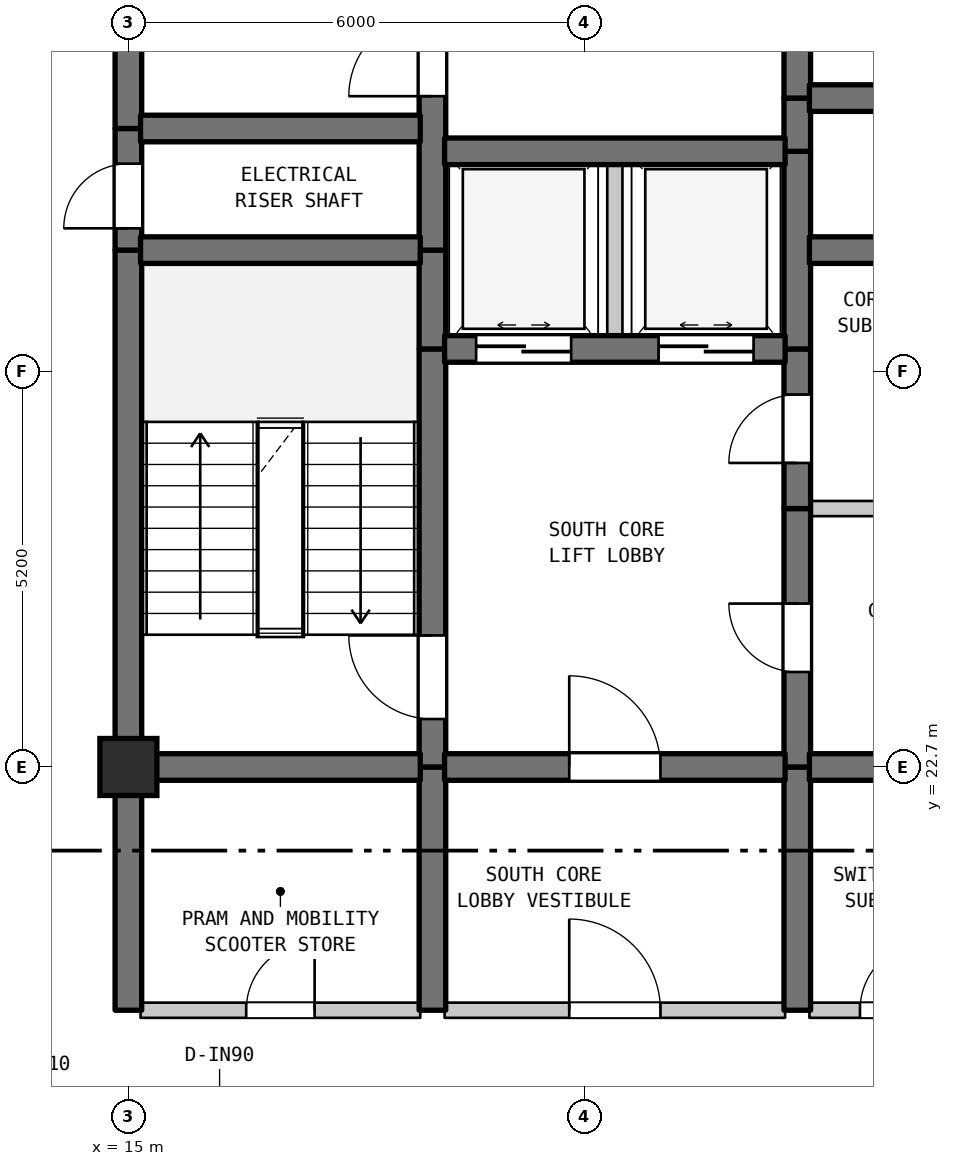
"""IFC4 building model, lengths in metres.
Left out: names, types, materials, properties, quantities, classifications, styles, units other than length and angle.
Written with IfcOpenShell. Run it as: python <this file> out.ifc"""

import sys

from ifc_helpers import new_model, si_unit, direction, frame, frame_2d, origin, origin_2d, place, context, subcontext, project, spatial, rectangle, extrude, element, fill, save


model = new_model("IFC4")
c1 = context("Model", 3, precision=1e-05, world=origin(), true_north=direction((0.0, 1.0)))
c2 = subcontext(c1, "Body", "Model", "MODEL_VIEW")
j1 = project(units=[si_unit("LENGTHUNIT", "METRE"), si_unit("PLANEANGLEUNIT", "RADIAN")], contexts=[c1])
p1 = place(None, origin())
s1 = spatial("IfcSite", under=j1, at=p1, CompositionType="ELEMENT")
p2 = place(p1, origin())
s2 = spatial("IfcBuilding", under=s1, at=p2, CompositionType="ELEMENT")
p3 = place(p2, frame((0.0, 0.0, 273.2)))
s3 = spatial("IfcBuildingStorey", under=s2, at=p3, CompositionType="ELEMENT", Elevation=273.2)
p4 = place(p3, frame((15.0, 22.7, 0.0), z_axis=(0.0, 0.0, 1.0), x_axis=(1.0, 0.0, 0.0)))
e1 = element("IfcColumn", 1, at=p4, inside=s3, PredefinedType="COLUMN", context=c2, shape_type="SweptSolid", body=[
    extrude(rectangle(XDim=0.75, YDim=0.75, at=origin_2d()), origin(), (0.0, 0.0, 1.0), 3.7),
])
p5 = place(p3, frame((15.0, 19.5, 0.0), z_axis=(0.0, 0.0, 1.0), x_axis=(0.0, 1.0, 0.0)))
e2 = element("IfcWall", 2, at=p5, inside=s3, PredefinedType="SHEAR", context=c2, shape_type="SweptSolid", body=[
    extrude(rectangle(XDim=3.2, YDim=0.35, at=frame_2d((1.6, 0.0))), origin(), (0.0, 0.0, 1.0), 3.39),
])
p6 = place(p3, frame((15.0, 22.7, 0.0), z_axis=(0.0, 0.0, 1.0), x_axis=(0.0, 1.0, 0.0)))
e3 = element("IfcWall", 3, at=p6, inside=s3, PredefinedType="SHEAR", context=c2, shape_type="SweptSolid", body=[
    extrude(rectangle(XDim=6.8, YDim=0.35, at=frame_2d((3.4, 0.0))), origin(), (0.0, 0.0, 1.0), 3.39),
])
p7 = place(p3, frame((15.0, 29.5, 0.0), z_axis=(0.0, 0.0, 1.0), x_axis=(0.0, 1.0, 0.0)))
e4 = element("IfcWall", 4, at=p7, inside=s3, PredefinedType="SHEAR", context=c2, shape_type="SweptSolid", body=[
    extrude(rectangle(XDim=1.6, YDim=0.35, at=frame_2d((0.8, 0.0))), origin(), (0.0, 0.0, 1.0), 3.39),
])
p8 = place(p7, frame((0.287, 0.0, 0.0)))
e5 = element("IfcOpeningElement", 5, at=p8, cuts=e4, PredefinedType="OPENING", context=c2, shape_type="SweptSolid", body=[
    extrude(rectangle(XDim=0.85, YDim=2.1, at=frame_2d((0.425, 1.05))), frame((0.0, 0.185, 0.0), z_axis=(0.0, -1.0, 0.0), x_axis=(1.0, 0.0, 0.0)), (0.0, 0.0, 1.0), 0.37),
])
p9 = place(p3, frame((15.0, 31.1, 0.0), z_axis=(0.0, 0.0, 1.0), x_axis=(0.0, 1.0, 0.0)))
e6 = element("IfcWall", 6, at=p9, inside=s3, PredefinedType="SHEAR", context=c2, shape_type="SweptSolid", body=[
    extrude(rectangle(XDim=6.8, YDim=0.35, at=frame_2d((3.4, 0.0))), origin(), (0.0, 0.0, 1.0), 3.39),
])
p10 = place(p3, frame((19.0, 19.5, 0.0), z_axis=(0.0, 0.0, 1.0), x_axis=(0.0, 1.0, 0.0)))
e7 = element("IfcWall", 7, at=p10, inside=s3, PredefinedType="SHEAR", context=c2, shape_type="SweptSolid", body=[
    extrude(rectangle(XDim=3.2, YDim=0.35, at=frame_2d((1.6, 0.0))), origin(), (0.0, 0.0, 1.0), 3.39),
])
p11 = place(p3, frame((19.0, 22.7, 0.0), z_axis=(0.0, 0.0, 1.0), x_axis=(0.0, 1.0, 0.0)))
e8 = element("IfcWall", 8, at=p11, inside=s3, PredefinedType="SHEAR", context=c2, shape_type="SweptSolid", body=[
    extrude(rectangle(XDim=5.5, YDim=0.35, at=frame_2d((2.75, 0.0))), origin(), (0.0, 0.0, 1.0), 3.39),
])
p12 = place(p11, frame((0.631, 0.0, 0.0)))
e9 = element("IfcOpeningElement", 9, at=p12, cuts=e8, PredefinedType="OPENING", context=c2, shape_type="SweptSolid", body=[
    extrude(rectangle(XDim=1.1, YDim=2.15, at=frame_2d((0.55, 1.075))), frame((0.0, 0.185, 0.0), z_axis=(0.0, -1.0, 0.0), x_axis=(1.0, 0.0, 0.0)), (0.0, 0.0, 1.0), 0.37),
])
p13 = place(p3, frame((19.0, 28.2, 0.0), z_axis=(0.0, 0.0, 1.0), x_axis=(0.0, 1.0, 0.0)))
e10 = element("IfcWall", 10, at=p13, inside=s3, PredefinedType="SHEAR", context=c2, shape_type="SweptSolid", body=[
    extrude(rectangle(XDim=1.3, YDim=0.35, at=frame_2d((0.65, 0.0))), origin(), (0.0, 0.0, 1.0), 3.39),
])
p14 = place(p3, frame((19.0, 29.5, 0.0), z_axis=(0.0, 0.0, 1.0), x_axis=(0.0, 1.0, 0.0)))
e11 = element("IfcWall", 11, at=p14, inside=s3, PredefinedType="SHEAR", context=c2, shape_type="SweptSolid", body=[
    extrude(rectangle(XDim=5.5, YDim=0.35, at=frame_2d((2.75, 0.0))), origin(), (0.0, 0.0, 1.0), 3.39),
])
p15 = place(p14, frame((2.025, 0.0, 0.0)))
e12 = element("IfcOpeningElement", 12, at=p15, cuts=e11, PredefinedType="OPENING", context=c2, shape_type="SweptSolid", body=[
    extrude(rectangle(XDim=1.1, YDim=2.15, at=frame_2d((0.55, 1.075))), frame((0.0, 0.185, 0.0), z_axis=(0.0, -1.0, 0.0), x_axis=(1.0, 0.0, 0.0)), (0.0, 0.0, 1.0), 0.37),
])
p16 = place(p3, frame((21.4, 28.2, 0.0), z_axis=(0.0, 0.0, 1.0), x_axis=(0.0, 1.0, 0.0)))
e13 = element("IfcWall", 13, at=p16, inside=s3, PredefinedType="STANDARD", context=c2, shape_type="SweptSolid", body=[
    extrude(rectangle(XDim=2.6, YDim=0.2, at=frame_2d((1.3, 0.0))), origin(), (0.0, 0.0, 1.0), 3.39),
])
p17 = place(p3, frame((23.8, 19.5, 0.0), z_axis=(0.0, 0.0, 1.0), x_axis=(0.0, 1.0, 0.0)))
e14 = element("IfcWall", 14, at=p17, inside=s3, PredefinedType="SHEAR", context=c2, shape_type="SweptSolid", body=[
    extrude(rectangle(XDim=3.2, YDim=0.35, at=frame_2d((1.6, 0.0))), origin(), (0.0, 0.0, 1.0), 3.39),
])
p18 = place(p3, frame((23.8, 22.7, 0.0), z_axis=(0.0, 0.0, 1.0), x_axis=(0.0, 1.0, 0.0)))
e15 = element("IfcWall", 15, at=p18, inside=s3, PredefinedType="SHEAR", context=c2, shape_type="SweptSolid", body=[
    extrude(rectangle(XDim=3.4, YDim=0.35, at=frame_2d((1.7, 0.0))), origin(), (0.0, 0.0, 1.0), 3.39),
])
p19 = place(p18, frame((1.25, 0.0, 0.0)))
e16 = element("IfcOpeningElement", 16, at=p19, cuts=e15, PredefinedType="OPENING", context=c2, shape_type="SweptSolid", body=[
    extrude(rectangle(XDim=0.9, YDim=2.15, at=frame_2d((0.45, 1.075))), frame((0.0, 0.185, 0.0), z_axis=(0.0, -1.0, 0.0), x_axis=(1.0, 0.0, 0.0)), (0.0, 0.0, 1.0), 0.37),
])
p20 = place(p3, frame((23.8, 26.1, 0.0), z_axis=(0.0, 0.0, 1.0), x_axis=(0.0, 1.0, 0.0)))
e17 = element("IfcWall", 17, at=p20, inside=s3, PredefinedType="SHEAR", context=c2, shape_type="SweptSolid", body=[
    extrude(rectangle(XDim=2.1, YDim=0.35, at=frame_2d((1.05, 0.0))), origin(), (0.0, 0.0, 1.0), 3.39),
])
p21 = place(p20, frame((0.6, 0.0, 0.0)))
e18 = element("IfcOpeningElement", 18, at=p21, cuts=e17, PredefinedType="OPENING", context=c2, shape_type="SweptSolid", body=[
    extrude(rectangle(XDim=0.9, YDim=2.15, at=frame_2d((0.45, 1.075))), frame((0.0, 0.185, 0.0), z_axis=(0.0, -1.0, 0.0), x_axis=(1.0, 0.0, 0.0)), (0.0, 0.0, 1.0), 0.37),
])
p22 = place(p3, frame((23.8, 28.2, 0.0), z_axis=(0.0, 0.0, 1.0), x_axis=(0.0, 1.0, 0.0)))
e19 = element("IfcWall", 19, at=p22, inside=s3, PredefinedType="SHEAR", context=c2, shape_type="SweptSolid", body=[
    extrude(rectangle(XDim=2.6, YDim=0.35, at=frame_2d((1.3, 0.0))), origin(), (0.0, 0.0, 1.0), 3.39),
])
p23 = place(p3, frame((23.8, 30.8, 0.0), z_axis=(0.0, 0.0, 1.0), x_axis=(0.0, 1.0, 0.0)))
e20 = element("IfcWall", 20, at=p23, inside=s3, PredefinedType="SHEAR", context=c2, shape_type="SweptSolid", body=[
    extrude(rectangle(XDim=0.7, YDim=0.35, at=frame_2d((0.35, 0.0))), origin(), (0.0, 0.0, 1.0), 3.39),
])
p24 = place(p3, frame((23.8, 31.5, 0.0), z_axis=(0.0, 0.0, 1.0), x_axis=(0.0, 1.0, 0.0)))
e21 = element("IfcWall", 21, at=p24, inside=s3, PredefinedType="SHEAR", context=c2, shape_type="SweptSolid", body=[
    extrude(rectangle(XDim=3.5, YDim=0.35, at=frame_2d((1.75, 0.0))), origin(), (0.0, 0.0, 1.0), 3.39),
])
p25 = place(p24, frame((1.127, 0.0, 0.0)))
e22 = element("IfcOpeningElement", 22, at=p25, cuts=e21, PredefinedType="OPENING", context=c2, shape_type="SweptSolid", body=[
    extrude(rectangle(XDim=1.1, YDim=2.15, at=frame_2d((0.55, 1.075))), frame((0.0, 0.185, 0.0), z_axis=(0.0, -1.0, 0.0), x_axis=(1.0, 0.0, 0.0)), (0.0, 0.0, 1.0), 0.37),
])
p26 = place(p3, frame((15.16, 19.5, 0.0), z_axis=(0.0, 0.0, 1.0), x_axis=(1.0, 0.0, 0.0)))
e23 = element("IfcWall", 23, at=p26, inside=s3, PredefinedType="STANDARD", context=c2, shape_type="SweptSolid", body=[
    extrude(rectangle(XDim=3.68, YDim=0.2, at=frame_2d((1.84, 0.0))), origin(), (0.0, 0.0, 1.0), 3.39),
])
p27 = place(p26, frame((1.39, 0.0, 0.0)))
e24 = element("IfcOpeningElement", 24, at=p27, cuts=e23, PredefinedType="OPENING", context=c2, shape_type="SweptSolid", body=[
    extrude(rectangle(XDim=0.9, YDim=2.15, at=frame_2d((0.45, 1.075))), frame((0.0, 0.11, 0.0), z_axis=(0.0, -1.0, 0.0), x_axis=(1.0, 0.0, 0.0)), (0.0, 0.0, 1.0), 0.22),
])
p28 = place(p3, frame((19.16, 19.5, 0.0), z_axis=(0.0, 0.0, 1.0), x_axis=(1.0, 0.0, 0.0)))
e25 = element("IfcWall", 25, at=p28, inside=s3, PredefinedType="STANDARD", context=c2, shape_type="SweptSolid", body=[
    extrude(rectangle(XDim=4.48, YDim=0.2, at=frame_2d((2.24, 0.0))), origin(), (0.0, 0.0, 1.0), 3.39),
])
p29 = place(p28, frame((1.64, 0.0, 0.0)))
e26 = element("IfcOpeningElement", 26, at=p29, cuts=e25, PredefinedType="OPENING", context=c2, shape_type="SweptSolid", body=[
    extrude(rectangle(XDim=1.2, YDim=2.2, at=frame_2d((0.6, 1.1))), frame((0.0, 0.11, 0.0), z_axis=(0.0, -1.0, 0.0), x_axis=(1.0, 0.0, 0.0)), (0.0, 0.0, 1.0), 0.22),
])
p30 = place(p3, frame((23.96, 19.5, 0.0), z_axis=(0.0, 0.0, 1.0), x_axis=(1.0, 0.0, 0.0)))
e27 = element("IfcWall", 27, at=p30, inside=s3, PredefinedType="STANDARD", context=c2, shape_type="SweptSolid", body=[
    extrude(rectangle(XDim=4.455, YDim=0.2, at=frame_2d((2.228, 0.0))), origin(), (0.0, 0.0, 1.0), 3.39),
])
p31 = place(p30, frame((0.665, 0.0, 0.0)))
e28 = element("IfcOpeningElement", 28, at=p31, cuts=e27, PredefinedType="OPENING", context=c2, shape_type="SweptSolid", body=[
    extrude(rectangle(XDim=0.9, YDim=2.15, at=frame_2d((0.45, 1.075))), frame((0.0, 0.11, 0.0), z_axis=(0.0, -1.0, 0.0), x_axis=(1.0, 0.0, 0.0)), (0.0, 0.0, 1.0), 0.22),
])
p32 = place(p30, frame((2.791, 0.0, 0.0)))
e29 = element("IfcOpeningElement", 29, at=p32, cuts=e27, PredefinedType="OPENING", context=c2, shape_type="SweptSolid", body=[
    extrude(rectangle(XDim=0.9, YDim=2.15, at=frame_2d((0.45, 1.075))), frame((0.0, 0.11, 0.0), z_axis=(0.0, -1.0, 0.0), x_axis=(1.0, 0.0, 0.0)), (0.0, 0.0, 1.0), 0.22),
])
p33 = place(p3, frame((15.16, 22.7, 0.0), z_axis=(0.0, 0.0, 1.0), x_axis=(1.0, 0.0, 0.0)))
e30 = element("IfcWall", 30, at=p33, inside=s3, PredefinedType="SHEAR", context=c2, shape_type="SweptSolid", body=[
    extrude(rectangle(XDim=3.68, YDim=0.35, at=frame_2d((1.84, 0.0))), origin(), (0.0, 0.0, 1.0), 3.39),
])
p34 = place(p3, frame((19.16, 22.7, 0.0), z_axis=(0.0, 0.0, 1.0), x_axis=(1.0, 0.0, 0.0)))
e31 = element("IfcWall", 31, at=p34, inside=s3, PredefinedType="SHEAR", context=c2, shape_type="SweptSolid", body=[
    extrude(rectangle(XDim=4.48, YDim=0.35, at=frame_2d((2.24, 0.0))), origin(), (0.0, 0.0, 1.0), 3.39),
])
p35 = place(p34, frame((1.64, 0.0, 0.0)))
e32 = element("IfcOpeningElement", 32, at=p35, cuts=e31, PredefinedType="OPENING", context=c2, shape_type="SweptSolid", body=[
    extrude(rectangle(XDim=1.2, YDim=2.2, at=frame_2d((0.6, 1.1))), frame((0.0, 0.185, 0.0), z_axis=(0.0, -1.0, 0.0), x_axis=(1.0, 0.0, 0.0)), (0.0, 0.0, 1.0), 0.37),
])
p36 = place(p3, frame((23.96, 22.7, 0.0), z_axis=(0.0, 0.0, 1.0), x_axis=(1.0, 0.0, 0.0)))
e33 = element("IfcWall", 33, at=p36, inside=s3, PredefinedType="SHEAR", context=c2, shape_type="SweptSolid", body=[
    extrude(rectangle(XDim=3.18, YDim=0.35, at=frame_2d((1.59, 0.0))), origin(), (0.0, 0.0, 1.0), 3.39),
])
p37 = place(p3, frame((23.96, 26.1, 0.0), z_axis=(0.0, 0.0, 1.0), x_axis=(1.0, 0.0, 0.0)))
e34 = element("IfcWall", 34, at=p37, inside=s3, PredefinedType="STANDARD", context=c2, shape_type="SweptSolid", body=[
    extrude(rectangle(XDim=3.18, YDim=0.2, at=frame_2d((1.59, 0.0))), origin(), (0.0, 0.0, 1.0), 3.39),
])
p38 = place(p3, frame((19.16, 28.2, 0.0), z_axis=(0.0, 0.0, 1.0), x_axis=(1.0, 0.0, 0.0)))
e35 = element("IfcWall", 35, at=p38, inside=s3, PredefinedType="SHEAR", context=c2, shape_type="SweptSolid", body=[
    extrude(rectangle(XDim=4.48, YDim=0.35, at=frame_2d((2.24, 0.0))), origin(), (0.0, 0.0, 1.0), 3.39),
])
p39 = place(p38, frame((0.415, 0.0, 0.0)))
e36 = element("IfcOpeningElement", 36, at=p39, cuts=e35, PredefinedType="OPENING", context=c2, shape_type="SweptSolid", body=[
    extrude(rectangle(XDim=1.25, YDim=2.2, at=frame_2d((0.625, 1.1))), frame((0.0, 0.185, 0.0), z_axis=(0.0, -1.0, 0.0), x_axis=(1.0, 0.0, 0.0)), (0.0, 0.0, 1.0), 0.37),
])
p40 = place(p38, frame((2.815, 0.0, 0.0)))
e37 = element("IfcOpeningElement", 37, at=p40, cuts=e35, PredefinedType="OPENING", context=c2, shape_type="SweptSolid", body=[
    extrude(rectangle(XDim=1.25, YDim=2.2, at=frame_2d((0.625, 1.1))), frame((0.0, 0.185, 0.0), z_axis=(0.0, -1.0, 0.0), x_axis=(1.0, 0.0, 0.0)), (0.0, 0.0, 1.0), 0.37),
])
p41 = place(p3, frame((15.16, 29.5, 0.0), z_axis=(0.0, 0.0, 1.0), x_axis=(1.0, 0.0, 0.0)))
e38 = element("IfcWall", 38, at=p41, inside=s3, PredefinedType="SHEAR", context=c2, shape_type="SweptSolid", body=[
    extrude(rectangle(XDim=3.68, YDim=0.35, at=frame_2d((1.84, 0.0))), origin(), (0.0, 0.0, 1.0), 3.39),
])
p42 = place(p3, frame((23.96, 29.5, 0.0), z_axis=(0.0, 0.0, 1.0), x_axis=(1.0, 0.0, 0.0)))
e39 = element("IfcWall", 39, at=p42, inside=s3, PredefinedType="SHEAR", context=c2, shape_type="SweptSolid", body=[
    extrude(rectangle(XDim=3.18, YDim=0.35, at=frame_2d((1.59, 0.0))), origin(), (0.0, 0.0, 1.0), 3.39),
])
p43 = place(p3, frame((19.16, 30.8, 0.0), z_axis=(0.0, 0.0, 1.0), x_axis=(1.0, 0.0, 0.0)))
e40 = element("IfcWall", 40, at=p43, inside=s3, PredefinedType="SHEAR", context=c2, shape_type="SweptSolid", body=[
    extrude(rectangle(XDim=4.48, YDim=0.35, at=frame_2d((2.24, 0.0))), origin(), (0.0, 0.0, 1.0), 3.39),
])
p44 = place(p3, frame((15.16, 31.1, 0.0), z_axis=(0.0, 0.0, 1.0), x_axis=(1.0, 0.0, 0.0)))
e41 = element("IfcWall", 41, at=p44, inside=s3, PredefinedType="SHEAR", context=c2, shape_type="SweptSolid", body=[
    extrude(rectangle(XDim=3.68, YDim=0.35, at=frame_2d((1.84, 0.0))), origin(), (0.0, 0.0, 1.0), 3.39),
])
p45 = place(p3, frame((23.96, 31.5, 0.0), z_axis=(0.0, 0.0, 1.0), x_axis=(1.0, 0.0, 0.0)))
e42 = element("IfcWall", 42, at=p45, inside=s3, PredefinedType="SHEAR", context=c2, shape_type="SweptSolid", body=[
    extrude(rectangle(XDim=3.18, YDim=0.35, at=frame_2d((1.59, 0.0))), origin(), (0.0, 0.0, 1.0), 3.39),
])
p46 = place(p45, frame((1.094, 0.0, 0.0)))
e43 = element("IfcOpeningElement", 43, at=p46, cuts=e42, PredefinedType="OPENING", context=c2, shape_type="SweptSolid", body=[
    extrude(rectangle(XDim=0.85, YDim=2.1, at=frame_2d((0.425, 1.05))), frame((0.0, 0.185, 0.0), z_axis=(0.0, -1.0, 0.0), x_axis=(1.0, 0.0, 0.0)), (0.0, 0.0, 1.0), 0.37),
])
p47 = place(p8, origin())
e44 = element("IfcDoor", 44, at=p47, inside=s3, OperationType="SINGLE_SWING_LEFT", PredefinedType="DOOR", context=c2, shape_type="SweptSolid", body=[
    extrude(rectangle(XDim=0.85, YDim=2.1, at=frame_2d((0.425, 1.05))), frame((0.0, 0.025, 0.0), z_axis=(0.0, -1.0, 0.0), x_axis=(1.0, 0.0, 0.0)), (0.0, 0.0, 1.0), 0.05),
])
fill(e5, e44)
p48 = place(p12, origin())
e45 = element("IfcDoor", 45, at=p48, inside=s3, OperationType="SINGLE_SWING_RIGHT", PredefinedType="DOOR", context=c2, shape_type="SweptSolid", body=[
    extrude(rectangle(XDim=1.1, YDim=2.15, at=frame_2d((0.55, 1.075))), frame((0.0, 0.025, 0.0), z_axis=(0.0, -1.0, 0.0), x_axis=(1.0, 0.0, 0.0)), (0.0, 0.0, 1.0), 0.05),
])
fill(e9, e45)
p49 = place(p15, origin())
e46 = element("IfcDoor", 46, at=p49, inside=s3, OperationType="SINGLE_SWING_LEFT", PredefinedType="DOOR", context=c2, shape_type="SweptSolid", body=[
    extrude(rectangle(XDim=1.1, YDim=2.15, at=frame_2d((0.55, 1.075))), frame((0.0, 0.025, 0.0), z_axis=(0.0, -1.0, 0.0), x_axis=(1.0, 0.0, 0.0)), (0.0, 0.0, 1.0), 0.05),
])
fill(e12, e46)
p50 = place(p19, origin())
e47 = element("IfcDoor", 47, at=p50, inside=s3, OperationType="SINGLE_SWING_RIGHT", PredefinedType="DOOR", context=c2, shape_type="SweptSolid", body=[
    extrude(rectangle(XDim=0.9, YDim=2.15, at=frame_2d((0.45, 1.075))), frame((0.0, 0.025, 0.0), z_axis=(0.0, -1.0, 0.0), x_axis=(1.0, 0.0, 0.0)), (0.0, 0.0, 1.0), 0.05),
])
fill(e16, e47)
p51 = place(p21, origin())
e48 = element("IfcDoor", 48, at=p51, inside=s3, OperationType="SINGLE_SWING_LEFT", PredefinedType="DOOR", context=c2, shape_type="SweptSolid", body=[
    extrude(rectangle(XDim=0.9, YDim=2.15, at=frame_2d((0.45, 1.075))), frame((0.0, 0.025, 0.0), z_axis=(0.0, -1.0, 0.0), x_axis=(1.0, 0.0, 0.0)), (0.0, 0.0, 1.0), 0.05),
])
fill(e18, e48)
p52 = place(p27, origin())
e49 = element("IfcDoor", 49, at=p52, inside=s3, OperationType="SINGLE_SWING_RIGHT", PredefinedType="DOOR", context=c2, shape_type="SweptSolid", body=[
    extrude(rectangle(XDim=0.9, YDim=2.15, at=frame_2d((0.45, 1.075))), frame((0.0, 0.025, 0.0), z_axis=(0.0, -1.0, 0.0), x_axis=(1.0, 0.0, 0.0)), (0.0, 0.0, 1.0), 0.05),
])
fill(e24, e49)
p53 = place(p29, origin())
e50 = element("IfcDoor", 50, at=p53, inside=s3, OperationType="SINGLE_SWING_LEFT", PredefinedType="DOOR", context=c2, shape_type="SweptSolid", body=[
    extrude(rectangle(XDim=1.2, YDim=2.2, at=frame_2d((0.6, 1.1))), frame((0.0, 0.025, 0.0), z_axis=(0.0, -1.0, 0.0), x_axis=(1.0, 0.0, 0.0)), (0.0, 0.0, 1.0), 0.05),
])
fill(e26, e50)
p54 = place(p31, origin())
e51 = element("IfcDoor", 51, at=p54, inside=s3, OperationType="SINGLE_SWING_RIGHT", PredefinedType="DOOR", context=c2, shape_type="SweptSolid", body=[
    extrude(rectangle(XDim=0.9, YDim=2.15, at=frame_2d((0.45, 1.075))), frame((0.0, 0.025, 0.0), z_axis=(0.0, -1.0, 0.0), x_axis=(1.0, 0.0, 0.0)), (0.0, 0.0, 1.0), 0.05),
])
fill(e28, e51)
p55 = place(p35, origin())
e52 = element("IfcDoor", 52, at=p55, inside=s3, OperationType="SINGLE_SWING_LEFT", PredefinedType="DOOR", context=c2, shape_type="SweptSolid", body=[
    extrude(rectangle(XDim=1.2, YDim=2.2, at=frame_2d((0.6, 1.1))), frame((0.0, 0.025, 0.0), z_axis=(0.0, -1.0, 0.0), x_axis=(1.0, 0.0, 0.0)), (0.0, 0.0, 1.0), 0.05),
])
fill(e32, e52)
p56 = place(p39, origin())
e53 = element("IfcDoor", 53, at=p56, inside=s3, OperationType="DOUBLE_DOOR_SLIDING", PredefinedType="DOOR", context=c2, shape_type="SweptSolid", body=[
    extrude(rectangle(XDim=1.25, YDim=2.2, at=frame_2d((0.625, 1.1))), frame((0.0, 0.025, 0.0), z_axis=(0.0, -1.0, 0.0), x_axis=(1.0, 0.0, 0.0)), (0.0, 0.0, 1.0), 0.05),
])
fill(e36, e53)
p57 = place(p40, origin())
e54 = element("IfcDoor", 54, at=p57, inside=s3, OperationType="DOUBLE_DOOR_SLIDING", PredefinedType="DOOR", context=c2, shape_type="SweptSolid", body=[
    extrude(rectangle(XDim=1.25, YDim=2.2, at=frame_2d((0.625, 1.1))), frame((0.0, 0.025, 0.0), z_axis=(0.0, -1.0, 0.0), x_axis=(1.0, 0.0, 0.0)), (0.0, 0.0, 1.0), 0.05),
])
fill(e37, e54)
save(model, sys.argv[1])
